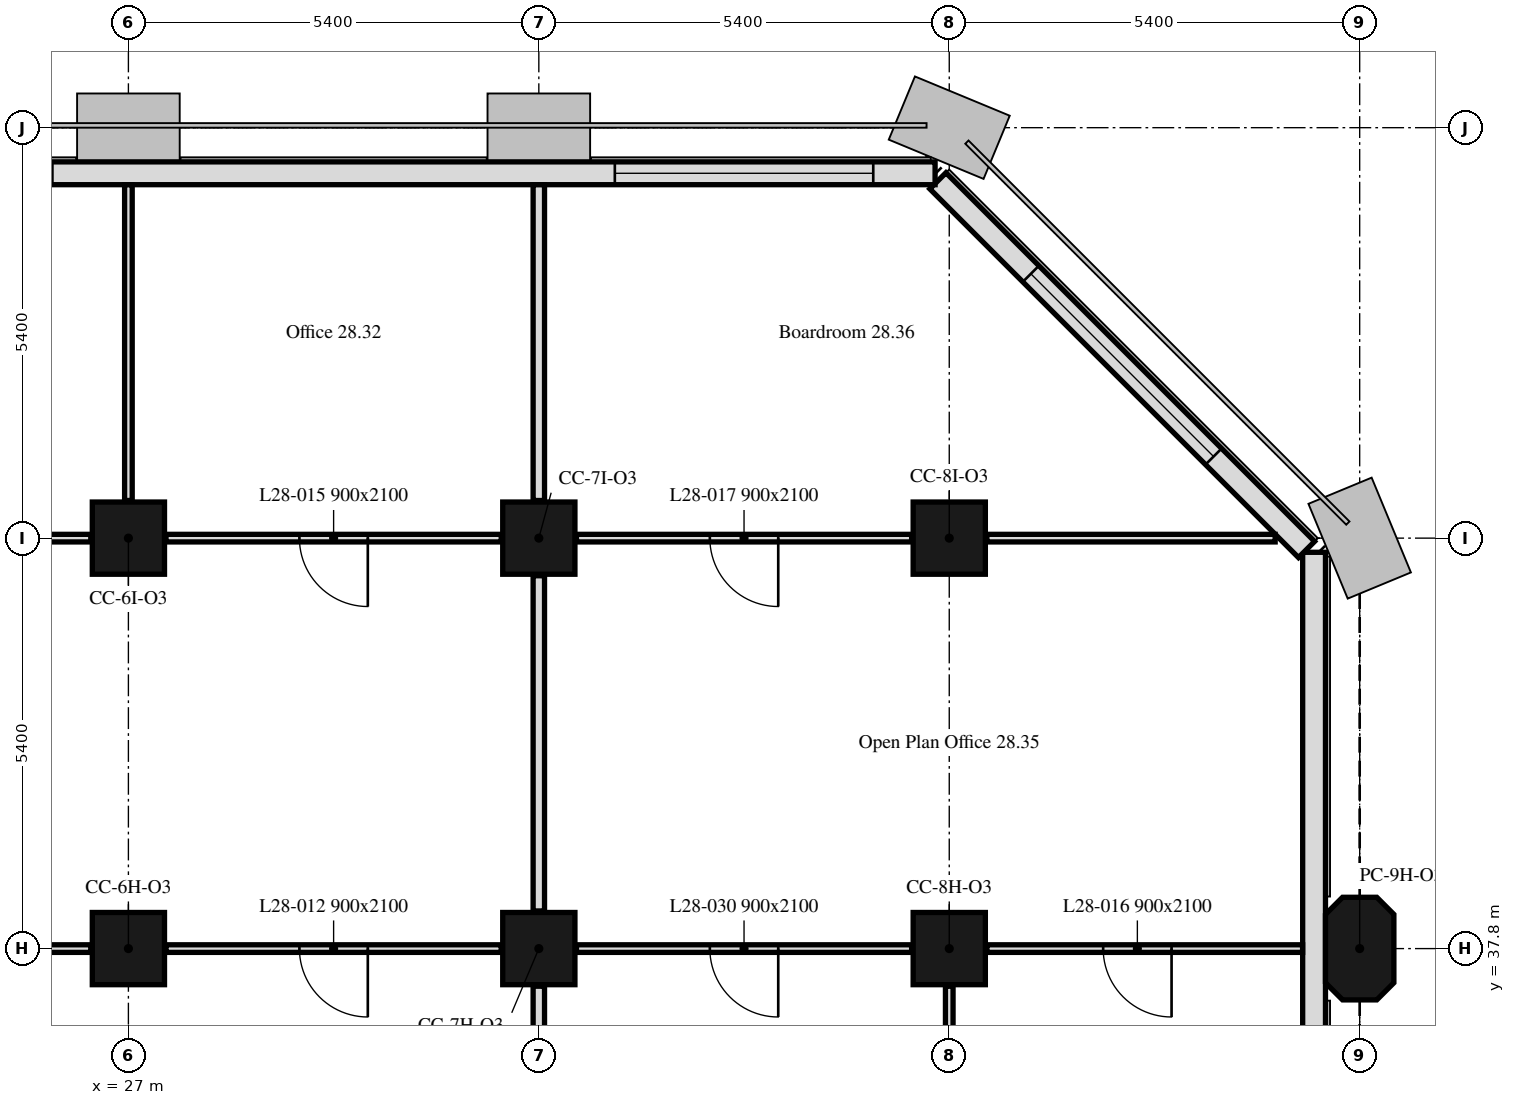
"""IFC4 building model, lengths in metres.
Left out: names, types, materials, properties, quantities, classifications, styles, units other than length and angle.
Written with IfcOpenShell. Run it as: python <this file> out.ifc"""

import sys

from ifc_helpers import new_model, si_unit, direction, frame, frame_2d, origin, origin_2d, place, context, subcontext, project, spatial, polyline, rectangle, outline, extrude, element, fill, save


model = new_model("IFC4")
c1 = context("Model", 3, precision=1e-05, world=origin(), true_north=direction((0.0, 1.0)))
c2 = subcontext(c1, "Body", "Model", "MODEL_VIEW")
j1 = project(units=[si_unit("LENGTHUNIT", "METRE"), si_unit("PLANEANGLEUNIT", "RADIAN")], contexts=[c1])
p1 = place(None, origin())
s1 = spatial("IfcSite", under=j1, at=p1, CompositionType="ELEMENT")
p2 = place(p1, origin())
s2 = spatial("IfcBuilding", under=s1, at=p2, CompositionType="ELEMENT")
p3 = place(p2, frame((0.0, 0.0, 118.2)))
s3 = spatial("IfcBuildingStorey", under=s2, at=p3, CompositionType="ELEMENT", Elevation=118.2)
for number, where, z_axis, x_axis in (
    (1, (27.0, 37.8, 0.0), (0.0, 0.0, 1.0), (1.0, 0.0, 0.0)),
    (2, (32.4, 37.8, 0.0), (0.0, 0.0, 1.0), (1.0, 0.0, 0.0)),
    (3, (37.8, 37.8, 0.0), (0.0, 0.0, 1.0), (1.0, 0.0, 0.0)),
):
    element("IfcColumn", number, at=place(p3, frame(where, z_axis=z_axis, x_axis=x_axis)), inside=s3, PredefinedType="COLUMN", context=c2, shape_type="SweptSolid", body=[
        extrude(rectangle(XDim=0.95, YDim=0.95, at=origin_2d()), origin(), (0.0, 0.0, 1.0), 3.5),
    ])
p4 = place(p3, frame((43.2, 37.8, 0.0), z_axis=(0.0, 0.0, 1.0), x_axis=(0.0, 1.0, 0.0)))
e4 = element("IfcColumn", 4, at=p4, inside=s3, PredefinedType="COLUMN", context=c2, shape_type="SweptSolid", body=[
    extrude(outline(polyline([(-0.45, -0.45), (0.45, -0.45), (0.675, -0.225), (0.675, 0.225), (0.45, 0.45), (-0.45, 0.45), (-0.675, 0.225), (-0.675, -0.225), (-0.45, -0.45)])), origin(), (0.0, 0.0, 1.0), 3.5),
])
for number, where, z_axis, x_axis in (
    (5, (27.0, 43.2, 0.0), (0.0, 0.0, 1.0), (1.0, 0.0, 0.0)),
    (6, (32.4, 43.2, 0.0), (0.0, 0.0, 1.0), (1.0, 0.0, 0.0)),
    (7, (37.8, 43.2, 0.0), (0.0, 0.0, 1.0), (1.0, 0.0, 0.0)),
):
    element("IfcColumn", number, at=place(p3, frame(where, z_axis=z_axis, x_axis=x_axis)), inside=s3, PredefinedType="COLUMN", context=c2, shape_type="SweptSolid", body=[
        extrude(rectangle(XDim=0.95, YDim=0.95, at=origin_2d()), origin(), (0.0, 0.0, 1.0), 3.5),
    ])
p5 = place(p3, frame((42.6, 32.4, 0.0), z_axis=(0.0, 0.0, 1.0), x_axis=(0.0, 1.0, 0.0)))
e8 = element("IfcWall", 8, at=p5, inside=s3, PredefinedType="SOLIDWALL", context=c2, shape_type="SweptSolid", body=[
    extrude(rectangle(XDim=10.614, YDim=0.3, at=frame_2d((5.307, 0.0))), origin(), (0.0, 0.0, 1.0), 3.5),
])
p6 = place(p5, frame((1.35, 0.0, 0.9)))
e9 = element("IfcOpeningElement", 9, at=p6, cuts=e8, PredefinedType="OPENING", context=c2, shape_type="SweptSolid", body=[
    extrude(rectangle(XDim=1.1, YDim=1.7, at=frame_2d((0.55, 0.85))), frame((0.0, 0.16, 0.0), z_axis=(0.0, -1.0, 0.0), x_axis=(1.0, 0.0, 0.0)), (0.0, 0.0, 1.0), 0.32),
])
p7 = place(p5, frame((2.95, 0.0, 0.9)))
e10 = element("IfcOpeningElement", 10, at=p7, cuts=e8, PredefinedType="OPENING", context=c2, shape_type="SweptSolid", body=[
    extrude(rectangle(XDim=1.1, YDim=1.7, at=frame_2d((0.55, 0.85))), frame((0.0, 0.16, 0.0), z_axis=(0.0, -1.0, 0.0), x_axis=(1.0, 0.0, 0.0)), (0.0, 0.0, 1.0), 0.32),
])
p8 = place(p3, frame((42.501, 43.051, 0.0), z_axis=(0.0, 0.0, 1.0), x_axis=(-0.707106781187, 0.707106781187, 0.0)))
e11 = element("IfcWall", 11, at=p8, inside=s3, PredefinedType="SOLIDWALL", context=c2, shape_type="SweptSolid", body=[
    extrude(rectangle(XDim=6.86, YDim=0.3, at=frame_2d((3.43, 0.0))), origin(), (0.0, 0.0, 1.0), 3.5),
])
p9 = place(p8, frame((1.73, 0.0, 0.9)))
e12 = element("IfcOpeningElement", 12, at=p9, cuts=e11, PredefinedType="OPENING", context=c2, shape_type="SweptSolid", body=[
    extrude(rectangle(XDim=3.4, YDim=1.7, at=frame_2d((1.7, 0.85))), frame((0.0, 0.16, 0.0), z_axis=(0.0, -1.0, 0.0), x_axis=(1.0, 0.0, 0.0)), (0.0, 0.0, 1.0), 0.32),
])
p10 = place(p3, frame((37.614, 48.0, 0.0), z_axis=(0.0, 0.0, 1.0), x_axis=(-1.0, 0.0, 0.0)))
e13 = element("IfcWall", 13, at=p10, inside=s3, PredefinedType="SOLIDWALL", context=c2, shape_type="SweptSolid", body=[
    extrude(rectangle(XDim=32.027, YDim=0.3, at=frame_2d((16.014, 0.0))), origin(), (0.0, 0.0, 1.0), 3.5),
])
p11 = place(p10, frame((0.814, 0.0, 0.9)))
e14 = element("IfcOpeningElement", 14, at=p11, cuts=e13, PredefinedType="OPENING", context=c2, shape_type="SweptSolid", body=[
    extrude(rectangle(XDim=3.4, YDim=1.7, at=frame_2d((1.7, 0.85))), frame((0.0, 0.16, 0.0), z_axis=(0.0, -1.0, 0.0), x_axis=(1.0, 0.0, 0.0)), (0.0, 0.0, 1.0), 0.32),
])
p12 = place(p10, frame((11.614, 0.0, 0.9)))
e15 = element("IfcOpeningElement", 15, at=p12, cuts=e13, PredefinedType="OPENING", context=c2, shape_type="SweptSolid", body=[
    extrude(rectangle(XDim=3.4, YDim=1.7, at=frame_2d((1.7, 0.85))), frame((0.0, 0.16, 0.0), z_axis=(0.0, -1.0, 0.0), x_axis=(1.0, 0.0, 0.0)), (0.0, 0.0, 1.0), 0.32),
])
p13 = place(p10, frame((22.414, 0.0, 0.9)))
e16 = element("IfcOpeningElement", 16, at=p13, cuts=e13, PredefinedType="OPENING", context=c2, shape_type="SweptSolid", body=[
    extrude(rectangle(XDim=3.4, YDim=1.7, at=frame_2d((1.7, 0.85))), frame((0.0, 0.16, 0.0), z_axis=(0.0, -1.0, 0.0), x_axis=(1.0, 0.0, 0.0)), (0.0, 0.0, 1.0), 0.32),
])
p14 = place(p3, frame((32.4, 35.175, 0.0), z_axis=(0.0, 0.0, 1.0), x_axis=(0.0, 1.0, 0.0)))
e17 = element("IfcWall", 17, at=p14, inside=s3, PredefinedType="PARTITIONING", context=c2, shape_type="SweptSolid", body=[
    extrude(rectangle(XDim=2.13, YDim=0.15, at=frame_2d((1.065, 0.0))), origin(), (0.0, 0.0, 1.0), 2.75),
])
p15 = place(p3, frame((31.905, 37.8, 0.0), z_axis=(0.0, 0.0, 1.0), x_axis=(-1.0, 0.0, 0.0)))
e18 = element("IfcWall", 18, at=p15, inside=s3, PredefinedType="PARTITIONING", context=c2, shape_type="SweptSolid", body=[
    extrude(rectangle(XDim=4.41, YDim=0.1, at=frame_2d((2.205, 0.0))), origin(), (0.0, 0.0, 1.0), 3.5),
])
p16 = place(p15, frame((1.755, 0.0, 0.0)))
e19 = element("IfcOpeningElement", 19, at=p16, cuts=e18, PredefinedType="OPENING", context=c2, shape_type="SweptSolid", body=[
    extrude(rectangle(XDim=0.9, YDim=2.1, at=frame_2d((0.45, 1.05))), frame((0.0, 0.05, 0.0), z_axis=(0.0, -1.0, 0.0), x_axis=(1.0, 0.0, 0.0)), (0.0, 0.0, 1.0), 0.1),
])
p17 = place(p3, frame((26.505, 37.8, 0.0), z_axis=(0.0, 0.0, 1.0), x_axis=(-1.0, 0.0, 0.0)))
e20 = element("IfcWall", 20, at=p17, inside=s3, PredefinedType="PARTITIONING", context=c2, shape_type="SweptSolid", body=[
    extrude(rectangle(XDim=4.41, YDim=0.1, at=frame_2d((2.205, 0.0))), origin(), (0.0, 0.0, 1.0), 3.5),
])
p18 = place(p3, frame((32.4, 38.295, 0.0), z_axis=(0.0, 0.0, 1.0), x_axis=(0.0, 1.0, 0.0)))
e21 = element("IfcWall", 21, at=p18, inside=s3, PredefinedType="PARTITIONING", context=c2, shape_type="SweptSolid", body=[
    extrude(rectangle(XDim=4.41, YDim=0.15, at=frame_2d((2.205, 0.0))), origin(), (0.0, 0.0, 1.0), 2.75),
])
p19 = place(p3, frame((31.905, 43.2, 0.0), z_axis=(0.0, 0.0, 1.0), x_axis=(-1.0, 0.0, 0.0)))
e22 = element("IfcWall", 22, at=p19, inside=s3, PredefinedType="PARTITIONING", context=c2, shape_type="SweptSolid", body=[
    extrude(rectangle(XDim=4.41, YDim=0.1, at=frame_2d((2.205, 0.0))), origin(), (0.0, 0.0, 1.0), 3.5),
])
p20 = place(p19, frame((1.755, 0.0, 0.0)))
e23 = element("IfcOpeningElement", 23, at=p20, cuts=e22, PredefinedType="OPENING", context=c2, shape_type="SweptSolid", body=[
    extrude(rectangle(XDim=0.9, YDim=2.1, at=frame_2d((0.45, 1.05))), frame((0.0, 0.05, 0.0), z_axis=(0.0, -1.0, 0.0), x_axis=(1.0, 0.0, 0.0)), (0.0, 0.0, 1.0), 0.1),
])
p21 = place(p3, frame((26.505, 43.2, 0.0), z_axis=(0.0, 0.0, 1.0), x_axis=(-1.0, 0.0, 0.0)))
e24 = element("IfcWall", 24, at=p21, inside=s3, PredefinedType="PARTITIONING", context=c2, shape_type="SweptSolid", body=[
    extrude(rectangle(XDim=4.41, YDim=0.1, at=frame_2d((2.205, 0.0))), origin(), (0.0, 0.0, 1.0), 3.5),
])
p22 = place(p21, frame((1.755, 0.0, 0.0)))
e25 = element("IfcOpeningElement", 25, at=p22, cuts=e24, PredefinedType="OPENING", context=c2, shape_type="SweptSolid", body=[
    extrude(rectangle(XDim=0.9, YDim=2.1, at=frame_2d((0.45, 1.05))), frame((0.0, 0.05, 0.0), z_axis=(0.0, -1.0, 0.0), x_axis=(1.0, 0.0, 0.0)), (0.0, 0.0, 1.0), 0.1),
])
p23 = place(p3, frame((27.0, 43.695, 0.0), z_axis=(0.0, 0.0, 1.0), x_axis=(0.0, 1.0, 0.0)))
e26 = element("IfcWall", 26, at=p23, inside=s3, PredefinedType="PARTITIONING", context=c2, shape_type="SweptSolid", body=[
    extrude(rectangle(XDim=4.154, YDim=0.1, at=frame_2d((2.077, 0.0))), origin(), (0.0, 0.0, 1.0), 2.75),
])
p24 = place(p3, frame((32.4, 43.695, 0.0), z_axis=(0.0, 0.0, 1.0), x_axis=(0.0, 1.0, 0.0)))
e27 = element("IfcWall", 27, at=p24, inside=s3, PredefinedType="PARTITIONING", context=c2, shape_type="SweptSolid", body=[
    extrude(rectangle(XDim=4.154, YDim=0.15, at=frame_2d((2.077, 0.0))), origin(), (0.0, 0.0, 1.0), 2.75),
])
p25 = place(p3, frame((37.8, 35.175, 0.0), z_axis=(0.0, 0.0, 1.0), x_axis=(0.0, 1.0, 0.0)))
e28 = element("IfcWall", 28, at=p25, inside=s3, PredefinedType="PARTITIONING", context=c2, shape_type="SweptSolid", body=[
    extrude(rectangle(XDim=2.13, YDim=0.1, at=frame_2d((1.065, 0.0))), origin(), (0.0, 0.0, 1.0), 3.5),
])
p26 = place(p3, frame((37.305, 37.8, 0.0), z_axis=(0.0, 0.0, 1.0), x_axis=(-1.0, 0.0, 0.0)))
e29 = element("IfcWall", 29, at=p26, inside=s3, PredefinedType="PARTITIONING", context=c2, shape_type="SweptSolid", body=[
    extrude(rectangle(XDim=4.41, YDim=0.1, at=frame_2d((2.205, 0.0))), origin(), (0.0, 0.0, 1.0), 3.5),
])
p27 = place(p26, frame((1.755, 0.0, 0.0)))
e30 = element("IfcOpeningElement", 30, at=p27, cuts=e29, PredefinedType="OPENING", context=c2, shape_type="SweptSolid", body=[
    extrude(rectangle(XDim=0.9, YDim=2.1, at=frame_2d((0.45, 1.05))), frame((0.0, 0.05, 0.0), z_axis=(0.0, -1.0, 0.0), x_axis=(1.0, 0.0, 0.0)), (0.0, 0.0, 1.0), 0.1),
])
p28 = place(p3, frame((42.449, 37.8, 0.0), z_axis=(0.0, 0.0, 1.0), x_axis=(-1.0, 0.0, 0.0)))
e31 = element("IfcWall", 31, at=p28, inside=s3, PredefinedType="PARTITIONING", context=c2, shape_type="SweptSolid", body=[
    extrude(rectangle(XDim=4.154, YDim=0.1, at=frame_2d((2.077, 0.0))), origin(), (0.0, 0.0, 1.0), 3.5),
])
p29 = place(p28, frame((1.724, 0.0, 0.0)))
e32 = element("IfcOpeningElement", 32, at=p29, cuts=e31, PredefinedType="OPENING", context=c2, shape_type="SweptSolid", body=[
    extrude(rectangle(XDim=0.9, YDim=2.1, at=frame_2d((0.45, 1.05))), frame((0.0, 0.05, 0.0), z_axis=(0.0, -1.0, 0.0), x_axis=(1.0, 0.0, 0.0)), (0.0, 0.0, 1.0), 0.1),
])
p30 = place(p3, frame((42.088, 43.2, 0.0), z_axis=(0.0, 0.0, 1.0), x_axis=(-1.0, 0.0, 0.0)))
e33 = element("IfcWall", 33, at=p30, inside=s3, PredefinedType="PARTITIONING", context=c2, shape_type="SweptSolid", body=[
    extrude(rectangle(XDim=3.793, YDim=0.1, at=frame_2d((1.896, 0.0))), origin(), (0.0, 0.0, 1.0), 3.5),
])
p31 = place(p3, frame((37.305, 43.2, 0.0), z_axis=(0.0, 0.0, 1.0), x_axis=(-1.0, 0.0, 0.0)))
e34 = element("IfcWall", 34, at=p31, inside=s3, PredefinedType="PARTITIONING", context=c2, shape_type="SweptSolid", body=[
    extrude(rectangle(XDim=4.41, YDim=0.1, at=frame_2d((2.205, 0.0))), origin(), (0.0, 0.0, 1.0), 3.5),
])
p32 = place(p31, frame((1.755, 0.0, 0.0)))
e35 = element("IfcOpeningElement", 35, at=p32, cuts=e34, PredefinedType="OPENING", context=c2, shape_type="SweptSolid", body=[
    extrude(rectangle(XDim=0.9, YDim=2.1, at=frame_2d((0.45, 1.05))), frame((0.0, 0.05, 0.0), z_axis=(0.0, -1.0, 0.0), x_axis=(1.0, 0.0, 0.0)), (0.0, 0.0, 1.0), 0.1),
])
p33 = place(p9, origin())
e36 = element("IfcWindow", 36, at=p33, inside=s3, PartitioningType="SINGLE_PANEL", PredefinedType="WINDOW", context=c2, shape_type="SweptSolid", body=[
    extrude(rectangle(XDim=3.4, YDim=1.7, at=frame_2d((1.7, 0.85))), frame((0.0, 0.03, 0.0), z_axis=(0.0, -1.0, 0.0), x_axis=(1.0, 0.0, 0.0)), (0.0, 0.0, 1.0), 0.06),
])
fill(e12, e36)
p34 = place(p11, origin())
e37 = element("IfcWindow", 37, at=p34, inside=s3, PartitioningType="SINGLE_PANEL", PredefinedType="WINDOW", context=c2, shape_type="SweptSolid", body=[
    extrude(rectangle(XDim=3.4, YDim=1.7, at=frame_2d((1.7, 0.85))), frame((0.0, 0.03, 0.0), z_axis=(0.0, -1.0, 0.0), x_axis=(1.0, 0.0, 0.0)), (0.0, 0.0, 1.0), 0.06),
])
fill(e14, e37)
p35 = place(p16, origin())
e38 = element("IfcDoor", 38, at=p35, inside=s3, OperationType="SINGLE_SWING_RIGHT", PredefinedType="DOOR", context=c2, shape_type="SweptSolid", body=[
    extrude(rectangle(XDim=0.9, YDim=2.1, at=frame_2d((0.45, 1.05))), frame((0.0, 0.025, 0.0), z_axis=(0.0, -1.0, 0.0), x_axis=(1.0, 0.0, 0.0)), (0.0, 0.0, 1.0), 0.05),
])
fill(e19, e38)
p36 = place(p20, origin())
e39 = element("IfcDoor", 39, at=p36, inside=s3, OperationType="SINGLE_SWING_RIGHT", PredefinedType="DOOR", context=c2, shape_type="SweptSolid", body=[
    extrude(rectangle(XDim=0.9, YDim=2.1, at=frame_2d((0.45, 1.05))), frame((0.0, 0.025, 0.0), z_axis=(0.0, -1.0, 0.0), x_axis=(1.0, 0.0, 0.0)), (0.0, 0.0, 1.0), 0.05),
])
fill(e23, e39)
p37 = place(p29, origin())
e40 = element("IfcDoor", 40, at=p37, inside=s3, OperationType="SINGLE_SWING_RIGHT", PredefinedType="DOOR", context=c2, shape_type="SweptSolid", body=[
    extrude(rectangle(XDim=0.9, YDim=2.1, at=frame_2d((0.45, 1.05))), frame((0.0, 0.025, 0.0), z_axis=(0.0, -1.0, 0.0), x_axis=(1.0, 0.0, 0.0)), (0.0, 0.0, 1.0), 0.05),
])
fill(e32, e40)
p38 = place(p32, origin())
e41 = element("IfcDoor", 41, at=p38, inside=s3, OperationType="SINGLE_SWING_RIGHT", PredefinedType="DOOR", context=c2, shape_type="SweptSolid", body=[
    extrude(rectangle(XDim=0.9, YDim=2.1, at=frame_2d((0.45, 1.05))), frame((0.0, 0.025, 0.0), z_axis=(0.0, -1.0, 0.0), x_axis=(1.0, 0.0, 0.0)), (0.0, 0.0, 1.0), 0.05),
])
fill(e35, e41)
p39 = place(p27, origin())
e42 = element("IfcDoor", 42, at=p39, inside=s3, OperationType="SINGLE_SWING_LEFT", PredefinedType="DOOR", context=c2, shape_type="SweptSolid", body=[
    extrude(rectangle(XDim=0.9, YDim=2.1, at=frame_2d((0.45, 1.05))), frame((0.0, 0.025, 0.0), z_axis=(0.0, -1.0, 0.0), x_axis=(1.0, 0.0, 0.0)), (0.0, 0.0, 1.0), 0.05),
])
fill(e30, e42)
save(model, sys.argv[1])
